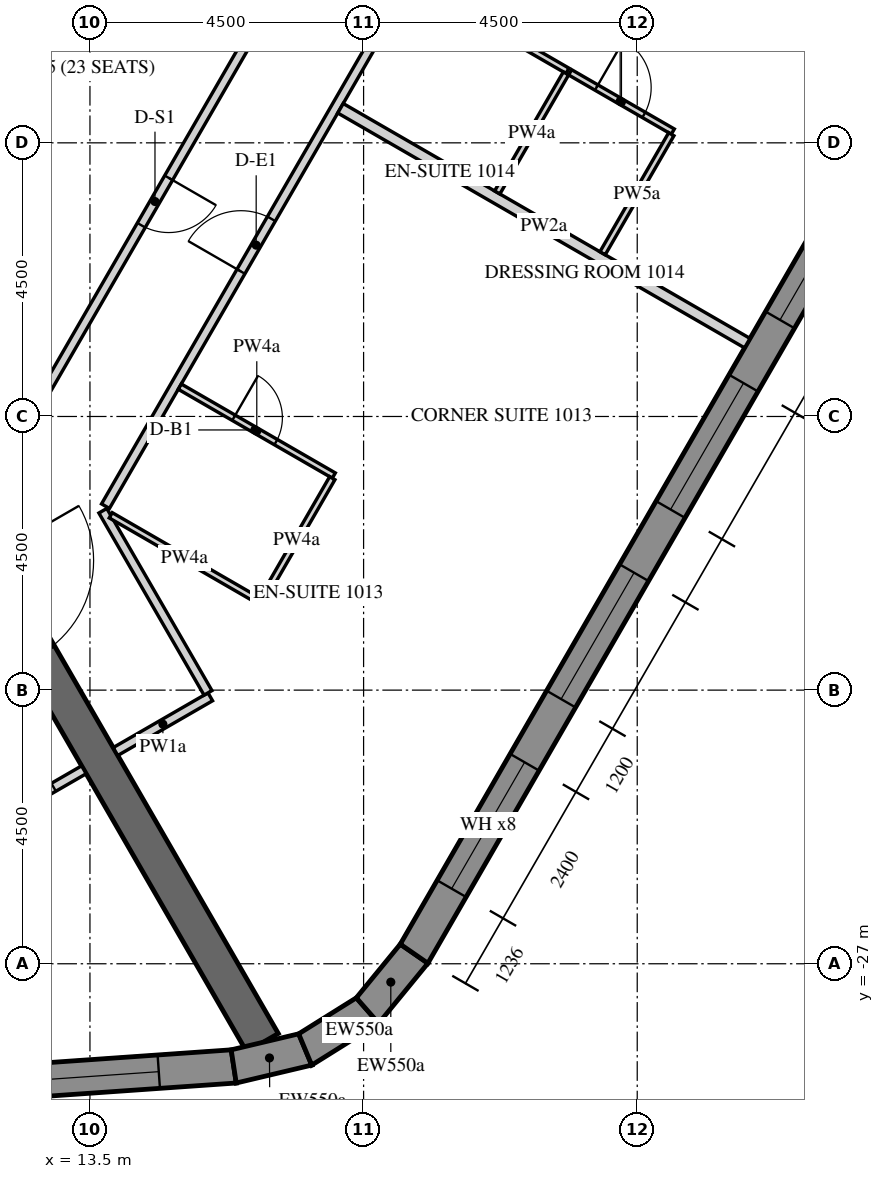
"""IFC4 building model, lengths in metres.
Left out: names, types, materials, properties, quantities, classifications, styles, units other than length and angle.
Written with IfcOpenShell. Run it as: python <this file> out.ifc"""

import sys

from ifc_helpers import new_model, si_unit, direction, frame, frame_2d, origin, place, context, subcontext, project, spatial, polyline, rectangle, outline, extrude, element, fill, save


model = new_model("IFC4")
c1 = context("Model", 3, precision=1e-05, world=origin(), true_north=direction((0.0, 1.0)))
c2 = subcontext(c1, "Body", "Model", "MODEL_VIEW")
j1 = project(units=[si_unit("LENGTHUNIT", "METRE"), si_unit("PLANEANGLEUNIT", "RADIAN")], contexts=[c1])
p1 = place(None, origin())
s1 = spatial("IfcSite", under=j1, at=p1, CompositionType="ELEMENT")
p2 = place(p1, origin())
s2 = spatial("IfcBuilding", under=s1, at=p2, CompositionType="ELEMENT")
p3 = place(p2, frame((0.0, 0.0, 142.8)))
s3 = spatial("IfcBuildingStorey", under=s2, at=p3, CompositionType="ELEMENT", Elevation=142.8)
p4 = place(p3, frame((-14.134, -30.786, -0.15), z_axis=(0.0, 0.0, 1.0), x_axis=(0.997564037441, 0.069756657061, 0.0)))
e1 = element("IfcWall", 1, at=p4, inside=s3, PredefinedType="SOLIDWALL", context=c2, shape_type="SweptSolid", body=[
    extrude(outline(polyline([(-0.026, -0.275), (30.094, -0.275), (30.049, 0.275), (0.026, 0.275), (-0.026, -0.275)])), origin(), (0.0, 0.0, 1.0), 3.75),
])
p5 = place(p4, frame((1.236, 0.0, 1.05)))
e2 = element("IfcOpeningElement", 2, at=p5, cuts=e1, PredefinedType="OPENING", context=c2, shape_type="SweptSolid", body=[
    extrude(rectangle(XDim=2.4, YDim=2.4, at=frame_2d((1.2, 1.2))), frame((0.0, 0.285, 0.0), z_axis=(0.0, -1.0, 0.0), x_axis=(1.0, 0.0, 0.0)), (0.0, 0.0, 1.0), 0.57),
])
p6 = place(p4, frame((4.835, 0.0, 1.05)))
e3 = element("IfcOpeningElement", 3, at=p6, cuts=e1, PredefinedType="OPENING", context=c2, shape_type="SweptSolid", body=[
    extrude(rectangle(XDim=2.4, YDim=2.4, at=frame_2d((1.2, 1.2))), frame((0.0, 0.285, 0.0), z_axis=(0.0, -1.0, 0.0), x_axis=(1.0, 0.0, 0.0)), (0.0, 0.0, 1.0), 0.57),
])
p7 = place(p4, frame((8.436, 0.0, 1.05)))
e4 = element("IfcOpeningElement", 4, at=p7, cuts=e1, PredefinedType="OPENING", context=c2, shape_type="SweptSolid", body=[
    extrude(rectangle(XDim=2.4, YDim=2.4, at=frame_2d((1.2, 1.2))), frame((0.0, 0.285, 0.0), z_axis=(0.0, -1.0, 0.0), x_axis=(1.0, 0.0, 0.0)), (0.0, 0.0, 1.0), 0.57),
])
p8 = place(p4, frame((12.035, 0.0, 1.05)))
e5 = element("IfcOpeningElement", 5, at=p8, cuts=e1, PredefinedType="OPENING", context=c2, shape_type="SweptSolid", body=[
    extrude(rectangle(XDim=2.4, YDim=2.4, at=frame_2d((1.2, 1.2))), frame((0.0, 0.285, 0.0), z_axis=(0.0, -1.0, 0.0), x_axis=(1.0, 0.0, 0.0)), (0.0, 0.0, 1.0), 0.57),
])
p9 = place(p4, frame((15.635, 0.0, 1.05)))
e6 = element("IfcOpeningElement", 6, at=p9, cuts=e1, PredefinedType="OPENING", context=c2, shape_type="SweptSolid", body=[
    extrude(rectangle(XDim=2.4, YDim=2.4, at=frame_2d((1.2, 1.2))), frame((0.0, 0.285, 0.0), z_axis=(0.0, -1.0, 0.0), x_axis=(1.0, 0.0, 0.0)), (0.0, 0.0, 1.0), 0.57),
])
p10 = place(p4, frame((19.236, 0.0, 1.05)))
e7 = element("IfcOpeningElement", 7, at=p10, cuts=e1, PredefinedType="OPENING", context=c2, shape_type="SweptSolid", body=[
    extrude(rectangle(XDim=2.4, YDim=2.4, at=frame_2d((1.2, 1.2))), frame((0.0, 0.285, 0.0), z_axis=(0.0, -1.0, 0.0), x_axis=(1.0, 0.0, 0.0)), (0.0, 0.0, 1.0), 0.57),
])
p11 = place(p4, frame((22.835, 0.0, 1.05)))
e8 = element("IfcOpeningElement", 8, at=p11, cuts=e1, PredefinedType="OPENING", context=c2, shape_type="SweptSolid", body=[
    extrude(rectangle(XDim=2.4, YDim=2.4, at=frame_2d((1.2, 1.2))), frame((0.0, 0.285, 0.0), z_axis=(0.0, -1.0, 0.0), x_axis=(1.0, 0.0, 0.0)), (0.0, 0.0, 1.0), 0.57),
])
p12 = place(p4, frame((26.436, 0.0, 1.05)))
e9 = element("IfcOpeningElement", 9, at=p12, cuts=e1, PredefinedType="OPENING", context=c2, shape_type="SweptSolid", body=[
    extrude(rectangle(XDim=2.4, YDim=2.4, at=frame_2d((1.2, 1.2))), frame((0.0, 0.285, 0.0), z_axis=(0.0, -1.0, 0.0), x_axis=(1.0, 0.0, 0.0)), (0.0, 0.0, 1.0), 0.57),
])
p13 = place(p3, frame((15.864, -28.688, -0.15), z_axis=(0.0, 0.0, 1.0), x_axis=(0.973063591128, 0.230536868247, 0.0)))
e10 = element("IfcWall", 10, at=p13, inside=s3, PredefinedType="SOLIDWALL", context=c2, shape_type="SweptSolid", body=[
    extrude(outline(polyline([(-0.022, -0.275), (1.253, -0.275), (1.163, 0.275), (0.022, 0.275), (-0.022, -0.275)])), origin(), (0.0, 0.0, 1.0), 3.75),
])
p14 = place(p3, frame((17.04, -28.41, -0.15), z_axis=(0.0, 0.0, 1.0), x_axis=(0.847952888306, 0.530071598195, 0.0)))
e11 = element("IfcWall", 11, at=p14, inside=s3, PredefinedType="SOLIDWALL", context=c2, shape_type="SweptSolid", body=[
    extrude(outline(polyline([(-0.045, -0.275), (1.253, -0.275), (1.163, 0.275), (0.045, 0.275), (-0.045, -0.275)])), origin(), (0.0, 0.0, 1.0), 3.75),
])
p15 = place(p3, frame((18.064, -27.769, -0.15), z_axis=(0.0, 0.0, 1.0), x_axis=(0.633842757806, 0.773461930787, 0.0)))
e12 = element("IfcWall", 12, at=p15, inside=s3, PredefinedType="SOLIDWALL", context=c2, shape_type="SweptSolid", body=[
    extrude(outline(polyline([(-0.045, -0.275), (1.231, -0.275), (1.186, 0.275), (0.045, 0.275), (-0.045, -0.275)])), origin(), (0.0, 0.0, 1.0), 3.75),
])
p16 = place(p3, frame((18.83, -26.835, -0.15), z_axis=(0.0, 0.0, 1.0), x_axis=(0.500003800416, 0.866023209602, 0.0)))
e13 = element("IfcWall", 13, at=p16, inside=s3, PredefinedType="SOLIDWALL", context=c2, shape_type="SweptSolid", body=[
    extrude(outline(polyline([(-0.022, -0.275), (30.097, -0.275), (30.045, 0.275), (0.022, 0.275), (-0.022, -0.275)])), origin(), (0.0, 0.0, 1.0), 3.75),
])
p17 = place(p16, frame((1.236, 0.0, 1.05)))
e14 = element("IfcOpeningElement", 14, at=p17, cuts=e13, PredefinedType="OPENING", context=c2, shape_type="SweptSolid", body=[
    extrude(rectangle(XDim=2.4, YDim=2.4, at=frame_2d((1.2, 1.2))), frame((0.0, 0.285, 0.0), z_axis=(0.0, -1.0, 0.0), x_axis=(1.0, 0.0, 0.0)), (0.0, 0.0, 1.0), 0.57),
])
p18 = place(p16, frame((4.835, 0.0, 1.05)))
e15 = element("IfcOpeningElement", 15, at=p18, cuts=e13, PredefinedType="OPENING", context=c2, shape_type="SweptSolid", body=[
    extrude(rectangle(XDim=2.4, YDim=2.4, at=frame_2d((1.2, 1.2))), frame((0.0, 0.285, 0.0), z_axis=(0.0, -1.0, 0.0), x_axis=(1.0, 0.0, 0.0)), (0.0, 0.0, 1.0), 0.57),
])
p19 = place(p16, frame((8.436, 0.0, 1.05)))
e16 = element("IfcOpeningElement", 16, at=p19, cuts=e13, PredefinedType="OPENING", context=c2, shape_type="SweptSolid", body=[
    extrude(rectangle(XDim=2.4, YDim=2.4, at=frame_2d((1.2, 1.2))), frame((0.0, 0.285, 0.0), z_axis=(0.0, -1.0, 0.0), x_axis=(1.0, 0.0, 0.0)), (0.0, 0.0, 1.0), 0.57),
])
p20 = place(p16, frame((12.035, 0.0, 1.05)))
e17 = element("IfcOpeningElement", 17, at=p20, cuts=e13, PredefinedType="OPENING", context=c2, shape_type="SweptSolid", body=[
    extrude(rectangle(XDim=2.4, YDim=2.4, at=frame_2d((1.2, 1.2))), frame((0.0, 0.285, 0.0), z_axis=(0.0, -1.0, 0.0), x_axis=(1.0, 0.0, 0.0)), (0.0, 0.0, 1.0), 0.57),
])
p21 = place(p16, frame((15.635, 0.0, 1.05)))
e18 = element("IfcOpeningElement", 18, at=p21, cuts=e13, PredefinedType="OPENING", context=c2, shape_type="SweptSolid", body=[
    extrude(rectangle(XDim=2.4, YDim=2.4, at=frame_2d((1.2, 1.2))), frame((0.0, 0.285, 0.0), z_axis=(0.0, -1.0, 0.0), x_axis=(1.0, 0.0, 0.0)), (0.0, 0.0, 1.0), 0.57),
])
p22 = place(p16, frame((19.236, 0.0, 1.05)))
e19 = element("IfcOpeningElement", 19, at=p22, cuts=e13, PredefinedType="OPENING", context=c2, shape_type="SweptSolid", body=[
    extrude(rectangle(XDim=2.4, YDim=2.4, at=frame_2d((1.2, 1.2))), frame((0.0, 0.285, 0.0), z_axis=(0.0, -1.0, 0.0), x_axis=(1.0, 0.0, 0.0)), (0.0, 0.0, 1.0), 0.57),
])
p23 = place(p16, frame((22.835, 0.0, 1.05)))
e20 = element("IfcOpeningElement", 20, at=p23, cuts=e13, PredefinedType="OPENING", context=c2, shape_type="SweptSolid", body=[
    extrude(rectangle(XDim=2.4, YDim=2.4, at=frame_2d((1.2, 1.2))), frame((0.0, 0.285, 0.0), z_axis=(0.0, -1.0, 0.0), x_axis=(1.0, 0.0, 0.0)), (0.0, 0.0, 1.0), 0.57),
])
p24 = place(p16, frame((26.436, 0.0, 1.05)))
e21 = element("IfcOpeningElement", 21, at=p24, cuts=e13, PredefinedType="OPENING", context=c2, shape_type="SweptSolid", body=[
    extrude(rectangle(XDim=2.4, YDim=2.4, at=frame_2d((1.2, 1.2))), frame((0.0, 0.285, 0.0), z_axis=(0.0, -1.0, 0.0), x_axis=(1.0, 0.0, 0.0)), (0.0, 0.0, 1.0), 0.57),
])
p25 = place(p3, frame((7.91, -13.7, -0.15), z_axis=(0.0, 0.0, 1.0), x_axis=(0.499999880136, 0.866025472988, 0.0)))
e22 = element("IfcWall", 22, at=p25, inside=s3, PredefinedType="SHEAR", context=c2, shape_type="SweptSolid", body=[
    extrude(outline(polyline([(-0.173, -0.3), (15.993, -0.3), (15.646, 0.3), (0.173, 0.3), (-0.173, -0.3)])), origin(), (0.0, 0.0, 1.0), 3.75),
])
p26 = place(p25, frame((7.039, 0.0, 0.15)))
e23 = element("IfcOpeningElement", 23, at=p26, cuts=e22, PredefinedType="OPENING", context=c2, shape_type="SweptSolid", body=[
    extrude(rectangle(XDim=1.8, YDim=2.4, at=frame_2d((0.9, 1.2))), frame((0.0, 0.31, 0.0), z_axis=(0.0, -1.0, 0.0), x_axis=(1.0, 0.0, 0.0)), (0.0, 0.0, 1.0), 0.62),
])
p27 = place(p3, frame((8.083, -14.0, -0.15), z_axis=(0.0, 0.0, 1.0), x_axis=(0.499997680643, -0.866026742862, 0.0)))
e24 = element("IfcWall", 24, at=p27, inside=s3, PredefinedType="SHEAR", context=c2, shape_type="SweptSolid", body=[
    extrude(rectangle(XDim=16.509, YDim=0.6, at=frame_2d((8.254, 0.0))), origin(), (0.0, 0.0, 1.0), 3.75),
])
p28 = place(p27, frame((7.354, 0.0, 0.15)))
e25 = element("IfcOpeningElement", 25, at=p28, cuts=e24, PredefinedType="OPENING", context=c2, shape_type="SweptSolid", body=[
    extrude(rectangle(XDim=1.8, YDim=2.4, at=frame_2d((0.9, 1.2))), frame((0.0, 0.31, 0.0), z_axis=(0.0, -1.0, 0.0), x_axis=(1.0, 0.0, 0.0)), (0.0, 0.0, 1.0), 0.62),
])
p29 = place(p3, frame((11.906, -24.673, 0.0), z_axis=(0.0, 0.0, 1.0), x_axis=(0.866013532718, 0.500020560727, 0.0)))
e26 = element("IfcWall", 26, at=p29, inside=s3, PredefinedType="PARTITIONING", context=c2, shape_type="SweptSolid", body=[
    extrude(rectangle(XDim=1.725, YDim=0.15, at=frame_2d((0.863, 0.0))), origin(), (0.0, 0.0, 1.0), 2.838),
])
p30 = place(p29, frame((0.15, 0.0, 0.0)))
e27 = element("IfcOpeningElement", 27, at=p30, cuts=e26, PredefinedType="OPENING", context=c2, shape_type="SweptSolid", body=[
    extrude(rectangle(XDim=1.0, YDim=2.1, at=frame_2d((0.5, 1.05))), frame((0.0, 0.085, 0.0), z_axis=(0.0, -1.0, 0.0), x_axis=(1.0, 0.0, 0.0)), (0.0, 0.0, 1.0), 0.17),
])
p31 = place(p3, frame((13.92, -23.51, 0.0), z_axis=(0.0, 0.0, 1.0), x_axis=(0.866047807691, 0.499961193289, 0.0)))
e28 = element("IfcWall", 28, at=p31, inside=s3, PredefinedType="PARTITIONING", context=c2, shape_type="SweptSolid", body=[
    extrude(rectangle(XDim=1.8, YDim=0.15, at=frame_2d((0.9, 0.0))), origin(), (0.0, 0.0, 1.0), 2.838),
])
p32 = place(p3, frame((15.441, -22.545, 0.0), z_axis=(0.0, 0.0, 1.0), x_axis=(-0.500003541824, 0.866023358902, 0.0)))
e29 = element("IfcWall", 29, at=p32, inside=s3, PredefinedType="PARTITIONING", context=c2, shape_type="SweptSolid", body=[
    extrude(rectangle(XDim=3.458, YDim=0.15, at=frame_2d((1.729, 0.0))), origin(), (0.0, 0.0, 1.0), 2.838),
])
p33 = place(p3, frame((13.755, -19.475, 0.0), z_axis=(0.0, 0.0, 1.0), x_axis=(0.50000013933, 0.866025323342, 0.0)))
e30 = element("IfcWall", 30, at=p33, inside=s3, PredefinedType="PARTITIONING", context=c2, shape_type="SweptSolid", body=[
    extrude(rectangle(XDim=23.517, YDim=0.15, at=frame_2d((11.758, 0.0))), origin(), (0.0, 0.0, 1.0), 2.838),
])
p34 = place(p33, frame((4.456, 0.0, 0.0)))
e31 = element("IfcOpeningElement", 31, at=p34, cuts=e30, PredefinedType="OPENING", context=c2, shape_type="SweptSolid", body=[
    extrude(rectangle(XDim=1.0, YDim=2.1, at=frame_2d((0.5, 1.05))), frame((0.0, 0.085, 0.0), z_axis=(0.0, -1.0, 0.0), x_axis=(1.0, 0.0, 0.0)), (0.0, 0.0, 1.0), 0.17),
])
p35 = place(p33, frame((13.699, 0.0, 0.0)))
e32 = element("IfcOpeningElement", 32, at=p35, cuts=e30, PredefinedType="OPENING", context=c2, shape_type="SweptSolid", body=[
    extrude(rectangle(XDim=1.0, YDim=2.1, at=frame_2d((0.5, 1.05))), frame((0.0, 0.085, 0.0), z_axis=(0.0, -1.0, 0.0), x_axis=(1.0, 0.0, 0.0)), (0.0, 0.0, 1.0), 0.17),
])
p36 = place(p33, frame((21.658, 0.0, 0.0)))
e33 = element("IfcOpeningElement", 33, at=p36, cuts=e30, PredefinedType="OPENING", context=c2, shape_type="SweptSolid", body=[
    extrude(rectangle(XDim=1.0, YDim=2.1, at=frame_2d((0.5, 1.05))), frame((0.0, 0.085, 0.0), z_axis=(0.0, -1.0, 0.0), x_axis=(1.0, 0.0, 0.0)), (0.0, 0.0, 1.0), 0.17),
])
p37 = place(p3, frame((16.643, -10.874, 0.0), z_axis=(0.0, 0.0, 1.0), x_axis=(-0.50000192383, -0.866024293058, 0.0)))
e34 = element("IfcWall", 34, at=p37, inside=s3, PredefinedType="PARTITIONING", context=c2, shape_type="SweptSolid", body=[
    extrude(rectangle(XDim=8.293, YDim=0.15, at=frame_2d((4.146, 0.0))), origin(), (0.0, 0.0, 1.0), 2.838),
])
p38 = place(p37, frame((3.697, 0.0, 0.0)))
e35 = element("IfcOpeningElement", 35, at=p38, cuts=e34, PredefinedType="OPENING", context=c2, shape_type="SweptSolid", body=[
    extrude(rectangle(XDim=0.9, YDim=2.1, at=frame_2d((0.45, 1.05))), frame((0.0, 0.085, 0.0), z_axis=(0.0, -1.0, 0.0), x_axis=(1.0, 0.0, 0.0)), (0.0, 0.0, 1.0), 0.17),
])
p39 = place(p3, frame((14.977, -17.509, 0.0), z_axis=(0.0, 0.0, 1.0), x_axis=(0.866046596414, -0.499963291492, 0.0)))
e36 = element("IfcWall", 36, at=p39, inside=s3, PredefinedType="PARTITIONING", context=c2, shape_type="SweptSolid", body=[
    extrude(rectangle(XDim=2.925, YDim=0.1, at=frame_2d((1.462, 0.0))), origin(), (0.0, 0.0, 1.0), 2.838),
])
p40 = place(p39, frame((1.025, 0.0, 0.0)))
e37 = element("IfcOpeningElement", 37, at=p40, cuts=e36, PredefinedType="OPENING", context=c2, shape_type="SweptSolid", body=[
    extrude(rectangle(XDim=0.8, YDim=2.1, at=frame_2d((0.4, 1.05))), frame((0.0, 0.06, 0.0), z_axis=(0.0, -1.0, 0.0), x_axis=(1.0, 0.0, 0.0)), (0.0, 0.0, 1.0), 0.12),
])
p41 = place(p3, frame((17.485, -19.015, 0.0), z_axis=(0.0, 0.0, 1.0), x_axis=(-0.500016218704, -0.866016039709, 0.0)))
e38 = element("IfcWall", 38, at=p41, inside=s3, PredefinedType="PARTITIONING", context=c2, shape_type="SweptSolid", body=[
    extrude(rectangle(XDim=2.35, YDim=0.1, at=frame_2d((1.175, 0.0))), origin(), (0.0, 0.0, 1.0), 2.838),
])
p42 = place(p3, frame((16.267, -21.025, 0.0), z_axis=(0.0, 0.0, 1.0), x_axis=(-0.866034573852, 0.49998411664, 0.0)))
e39 = element("IfcWall", 39, at=p42, inside=s3, PredefinedType="PARTITIONING", context=c2, shape_type="SweptSolid", body=[
    extrude(rectangle(XDim=2.8, YDim=0.1, at=frame_2d((1.4, 0.0))), origin(), (0.0, 0.0, 1.0), 2.838),
])
p43 = place(p3, frame((24.31, -16.794, 0.0), z_axis=(0.0, 0.0, 1.0), x_axis=(-0.866027174938, 0.499996932259, 0.0)))
e40 = element("IfcWall", 40, at=p43, inside=s3, PredefinedType="PARTITIONING", context=c2, shape_type="SweptSolid", body=[
    extrude(rectangle(XDim=7.725, YDim=0.18, at=frame_2d((3.863, 0.0))), origin(), (0.0, 0.0, 1.0), 2.838),
])
p44 = place(p3, frame((18.82, -10.853, 0.0), z_axis=(0.0, 0.0, 1.0), x_axis=(0.866046596414, -0.499963291492, 0.0)))
e41 = element("IfcWall", 41, at=p44, inside=s3, PredefinedType="PARTITIONING", context=c2, shape_type="SweptSolid", body=[
    extrude(rectangle(XDim=2.925, YDim=0.1, at=frame_2d((1.462, 0.0))), origin(), (0.0, 0.0, 1.0), 2.838),
])
p45 = place(p44, frame((1.025, 0.0, 0.0)))
e42 = element("IfcOpeningElement", 42, at=p45, cuts=e41, PredefinedType="OPENING", context=c2, shape_type="SweptSolid", body=[
    extrude(rectangle(XDim=0.8, YDim=2.1, at=frame_2d((0.4, 1.05))), frame((0.0, 0.06, 0.0), z_axis=(0.0, -1.0, 0.0), x_axis=(1.0, 0.0, 0.0)), (0.0, 0.0, 1.0), 0.12),
])
p46 = place(p3, frame((21.396, -12.34, 0.0), z_axis=(0.0, 0.0, 1.0), x_axis=(0.866031321059, -0.49998975084, 0.0)))
e43 = element("IfcWall", 43, at=p46, inside=s3, PredefinedType="PARTITIONING", context=c2, shape_type="SweptSolid", body=[
    extrude(rectangle(XDim=1.95, YDim=0.1, at=frame_2d((0.975, 0.0))), origin(), (0.0, 0.0, 1.0), 2.838),
])
p47 = place(p46, frame((0.5, 0.0, 0.0)))
e44 = element("IfcOpeningElement", 44, at=p47, cuts=e43, PredefinedType="OPENING", context=c2, shape_type="SweptSolid", body=[
    extrude(rectangle(XDim=0.9, YDim=2.1, at=frame_2d((0.45, 1.05))), frame((0.0, 0.06, 0.0), z_axis=(0.0, -1.0, 0.0), x_axis=(1.0, 0.0, 0.0)), (0.0, 0.0, 1.0), 0.12),
])
for number, where, z_axis, x_axis in (
    (45, (23.06, -13.359, 0.0), (0.0, 0.0, 1.0), (-0.5, -0.866, 0.0)),
    (46, (20.198, -14.316, 0.0), (0.0, 0.0, 1.0), (0.5, 0.866, 0.0)),
):
    element("IfcWall", number, at=place(p3, frame(where, z_axis=z_axis, x_axis=x_axis)), inside=s3, PredefinedType="PARTITIONING", context=c2, shape_type="SweptSolid", body=[
        extrude(rectangle(XDim=2.26, YDim=0.1, at=frame_2d((1.13, 0.0))), origin(), (0.0, 0.0, 1.0), 2.838),
    ])
p48 = place(p12, frame((0.0, 0.205, 0.0)))
e47 = element("IfcWindow", 47, at=p48, inside=s3, PartitioningType="DOUBLE_PANEL_VERTICAL", PredefinedType="WINDOW", context=c2, shape_type="SweptSolid", body=[
    extrude(rectangle(XDim=2.4, YDim=2.4, at=frame_2d((1.2, 1.2))), frame((0.0, 0.03, 0.0), z_axis=(0.0, -1.0, 0.0), x_axis=(1.0, 0.0, 0.0)), (0.0, 0.0, 1.0), 0.06),
])
fill(e9, e47)
p49 = place(p17, frame((0.0, 0.205, 0.0)))
e48 = element("IfcWindow", 48, at=p49, inside=s3, PartitioningType="DOUBLE_PANEL_VERTICAL", PredefinedType="WINDOW", context=c2, shape_type="SweptSolid", body=[
    extrude(rectangle(XDim=2.4, YDim=2.4, at=frame_2d((1.2, 1.2))), frame((0.0, 0.03, 0.0), z_axis=(0.0, -1.0, 0.0), x_axis=(1.0, 0.0, 0.0)), (0.0, 0.0, 1.0), 0.06),
])
fill(e14, e48)
p50 = place(p18, frame((0.0, 0.205, 0.0)))
e49 = element("IfcWindow", 49, at=p50, inside=s3, PartitioningType="DOUBLE_PANEL_VERTICAL", PredefinedType="WINDOW", context=c2, shape_type="SweptSolid", body=[
    extrude(rectangle(XDim=2.4, YDim=2.4, at=frame_2d((1.2, 1.2))), frame((0.0, 0.03, 0.0), z_axis=(0.0, -1.0, 0.0), x_axis=(1.0, 0.0, 0.0)), (0.0, 0.0, 1.0), 0.06),
])
fill(e15, e49)
p51 = place(p19, frame((0.0, 0.205, 0.0)))
e50 = element("IfcWindow", 50, at=p51, inside=s3, PartitioningType="DOUBLE_PANEL_VERTICAL", PredefinedType="WINDOW", context=c2, shape_type="SweptSolid", body=[
    extrude(rectangle(XDim=2.4, YDim=2.4, at=frame_2d((1.2, 1.2))), frame((0.0, 0.03, 0.0), z_axis=(0.0, -1.0, 0.0), x_axis=(1.0, 0.0, 0.0)), (0.0, 0.0, 1.0), 0.06),
])
fill(e16, e50)
p52 = place(p20, frame((0.0, 0.205, 0.0)))
e51 = element("IfcWindow", 51, at=p52, inside=s3, PartitioningType="DOUBLE_PANEL_VERTICAL", PredefinedType="WINDOW", context=c2, shape_type="SweptSolid", body=[
    extrude(rectangle(XDim=2.4, YDim=2.4, at=frame_2d((1.2, 1.2))), frame((0.0, 0.03, 0.0), z_axis=(0.0, -1.0, 0.0), x_axis=(1.0, 0.0, 0.0)), (0.0, 0.0, 1.0), 0.06),
])
fill(e17, e51)
p53 = place(p30, origin())
e52 = element("IfcDoor", 52, at=p53, inside=s3, OperationType="SINGLE_SWING_RIGHT", PredefinedType="DOOR", context=c2, shape_type="SweptSolid", body=[
    extrude(rectangle(XDim=1.0, YDim=2.1, at=frame_2d((0.5, 1.05))), frame((0.0, 0.025, 0.0), z_axis=(0.0, -1.0, 0.0), x_axis=(1.0, 0.0, 0.0)), (0.0, 0.0, 1.0), 0.05),
])
fill(e27, e52)
p54 = place(p34, origin())
e53 = element("IfcDoor", 53, at=p54, inside=s3, OperationType="SINGLE_SWING_LEFT", PredefinedType="DOOR", context=c2, shape_type="SweptSolid", body=[
    extrude(rectangle(XDim=1.0, YDim=2.1, at=frame_2d((0.5, 1.05))), frame((0.0, 0.025, 0.0), z_axis=(0.0, -1.0, 0.0), x_axis=(1.0, 0.0, 0.0)), (0.0, 0.0, 1.0), 0.05),
])
fill(e31, e53)
p55 = place(p40, origin())
e54 = element("IfcDoor", 54, at=p55, inside=s3, OperationType="SINGLE_SWING_RIGHT", PredefinedType="DOOR", context=c2, shape_type="SweptSolid", body=[
    extrude(rectangle(XDim=0.8, YDim=2.1, at=frame_2d((0.4, 1.05))), frame((0.0, 0.025, 0.0), z_axis=(0.0, -1.0, 0.0), x_axis=(1.0, 0.0, 0.0)), (0.0, 0.0, 1.0), 0.05),
])
fill(e37, e54)
p56 = place(p47, origin())
e55 = element("IfcDoor", 55, at=p56, inside=s3, OperationType="SINGLE_SWING_RIGHT", PredefinedType="DOOR", context=c2, shape_type="SweptSolid", body=[
    extrude(rectangle(XDim=0.9, YDim=2.1, at=frame_2d((0.45, 1.05))), frame((0.0, 0.025, 0.0), z_axis=(0.0, -1.0, 0.0), x_axis=(1.0, 0.0, 0.0)), (0.0, 0.0, 1.0), 0.05),
])
fill(e44, e55)
p57 = place(p38, origin())
e56 = element("IfcDoor", 56, at=p57, inside=s3, OperationType="SINGLE_SWING_RIGHT", PredefinedType="DOOR", context=c2, shape_type="SweptSolid", body=[
    extrude(rectangle(XDim=0.9, YDim=2.1, at=frame_2d((0.45, 1.05))), frame((0.0, 0.025, 0.0), z_axis=(0.0, -1.0, 0.0), x_axis=(1.0, 0.0, 0.0)), (0.0, 0.0, 1.0), 0.05),
])
fill(e35, e56)
save(model, sys.argv[1])
